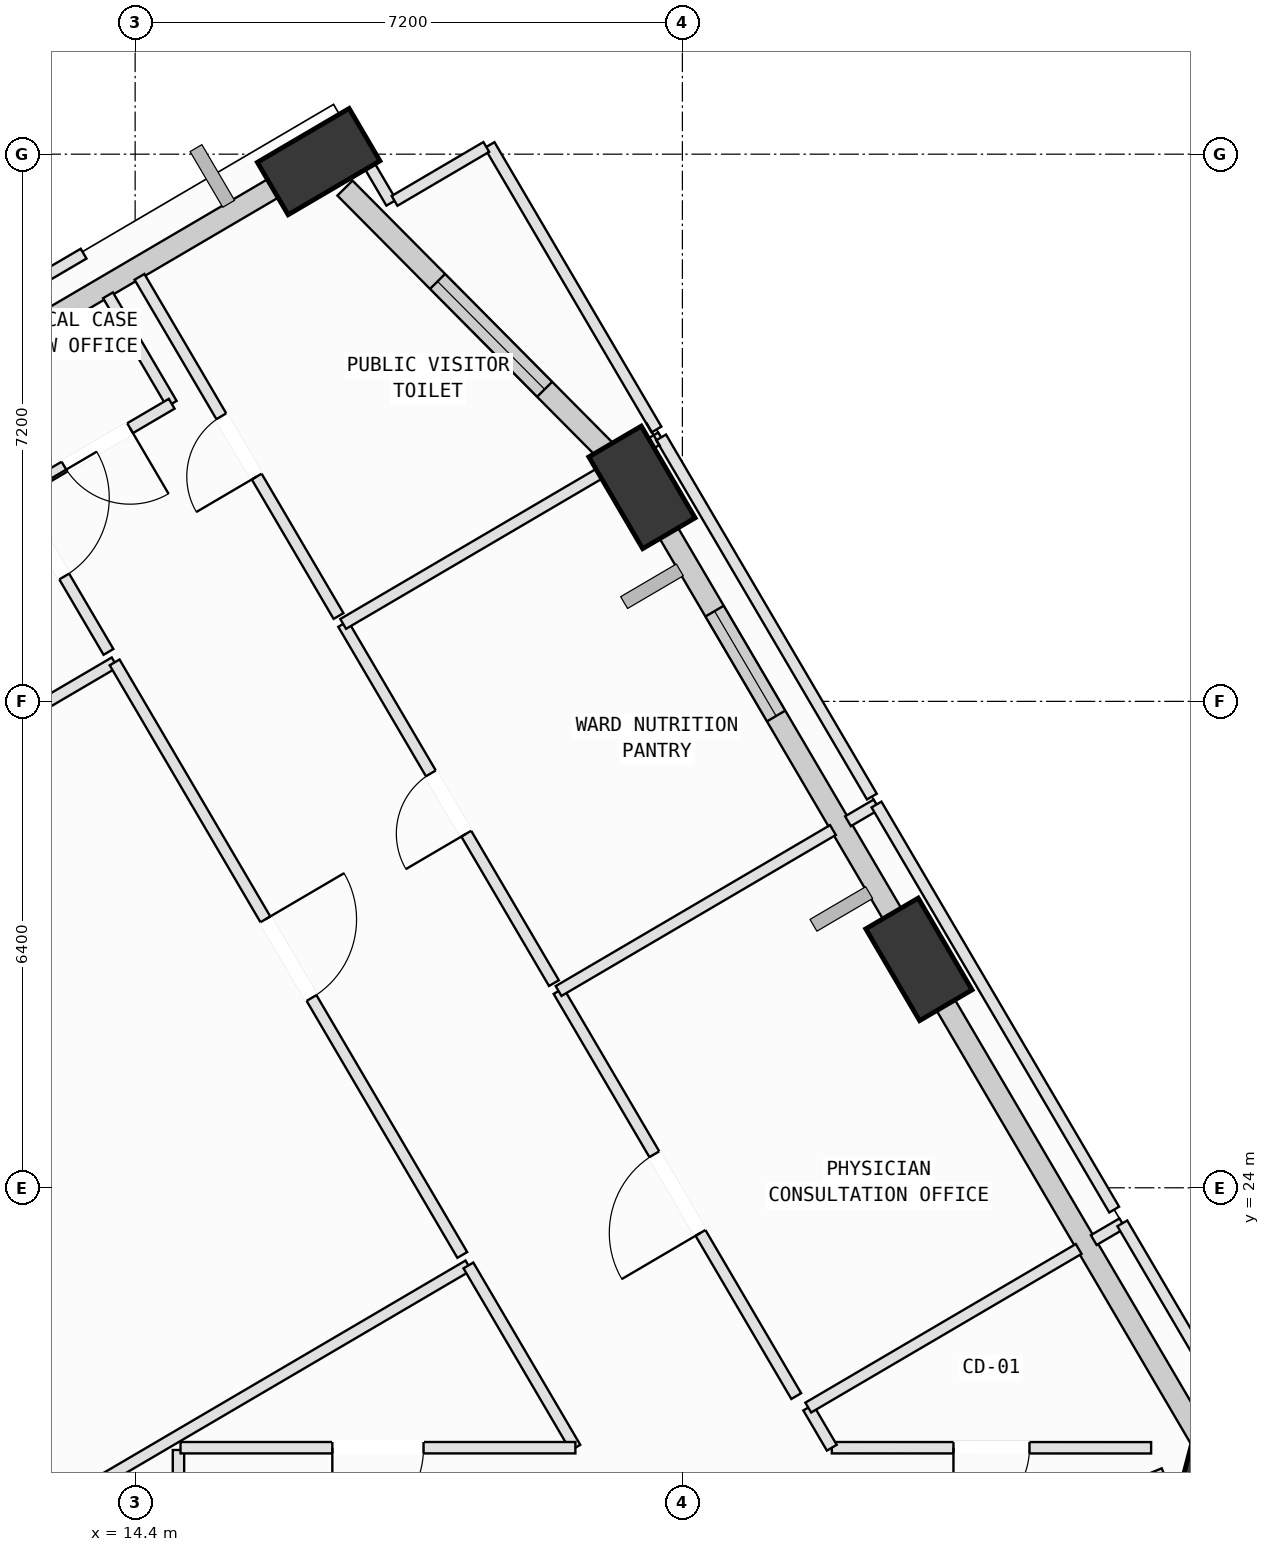
"""IFC4 building model, lengths in metres.
Left out: names, types, materials, properties, quantities, classifications, styles, units other than length and angle.
Written with IfcOpenShell. Run it as: python <this file> out.ifc"""

import sys

from ifc_helpers import new_model, si_unit, direction, frame, frame_2d, origin, origin_2d, place, context, subcontext, project, spatial, rectangle, extrude, element, fill, save


model = new_model("IFC4")
c1 = context("Model", 3, precision=1e-05, world=origin(), true_north=direction((0.0, 1.0)))
c2 = subcontext(c1, "Body", "Model", "MODEL_VIEW")
j1 = project(units=[si_unit("LENGTHUNIT", "METRE"), si_unit("PLANEANGLEUNIT", "RADIAN")], contexts=[c1])
p1 = place(None, origin())
s1 = spatial("IfcSite", under=j1, at=p1, CompositionType="ELEMENT")
p2 = place(p1, origin())
s2 = spatial("IfcBuilding", under=s1, at=p2, CompositionType="ELEMENT")
p3 = place(p2, frame((0.0, 0.0, 153.8)))
s3 = spatial("IfcBuildingStorey", under=s2, at=p3, CompositionType="ELEMENT", Elevation=153.8)
p4 = place(p3, frame((28.634, 20.321, 0.002), z_axis=(0.018686718776, -0.020396614612, 0.999617319105), x_axis=(-0.467601093999, 0.883534166025, 0.026769280116)))
e1 = element("IfcColumn", 1, at=p4, inside=s3, PredefinedType="COLUMN", context=c2, shape_type="SweptSolid", body=[
    extrude(rectangle(XDim=1.4, YDim=0.8, at=origin_2d()), origin(), (0.0, 0.0, 1.0), 3.998),
])
p5 = place(p3, frame((24.712, 27.006, 0.002), z_axis=(-0.008851816593, -0.036933441647, 0.999278522851), x_axis=(-0.291217556867, 0.956095845125, 0.032757739664)))
e2 = element("IfcColumn", 2, at=p5, inside=s3, PredefinedType="COLUMN", context=c2, shape_type="SweptSolid", body=[
    extrude(rectangle(XDim=1.4, YDim=0.8, at=origin_2d()), origin(), (0.0, 0.0, 1.0), 3.999),
])
p6 = place(p3, frame((21.068, 33.216, 0.002), z_axis=(-0.034388116319, -0.052130921015, 0.998048007127), x_axis=(0.051597216998, 0.997214254975, 0.053865173095)))
e3 = element("IfcColumn", 3, at=p6, inside=s3, PredefinedType="COLUMN", context=c2, shape_type="SweptSolid", body=[
    extrude(rectangle(XDim=1.4, YDim=0.8, at=origin_2d()), origin(), (0.0, 0.0, 1.0), 4.004),
])
p7 = place(p3, frame((16.814, 37.502, 0.002), z_axis=(-0.051852664615, -0.069745485504, 0.996216275928), x_axis=(0.992953500055, -0.110041878565, 0.043978764079)))
e4 = element("IfcColumn", 4, at=p7, inside=s3, PredefinedType="COLUMN", context=c2, shape_type="SweptSolid", body=[
    extrude(rectangle(XDim=1.4, YDim=0.8, at=origin_2d()), origin(), (0.0, 0.0, 1.0), 4.011),
])
p8 = place(p3, frame((28.41, 20.702, 0.0), z_axis=(0.0, 0.0, 1.0), x_axis=(-0.50604756903, 0.862505569767, 0.0)))
e5 = element("IfcWall", 5, at=p8, inside=s3, PredefinedType="SOLIDWALL", context=c2, shape_type="SweptSolid", body=[
    extrude(rectangle(XDim=6.76, YDim=0.28, at=frame_2d((3.38, 0.0))), origin(), (0.0, 0.0, 1.0), 3.165),
])
p9 = place(p3, frame((24.49, 27.384, 0.0), z_axis=(0.0, 0.0, 1.0), x_axis=(-0.506018502958, 0.862522622697, 0.0)))
e6 = element("IfcWall", 6, at=p9, inside=s3, PredefinedType="SOLIDWALL", context=c2, shape_type="SweptSolid", body=[
    extrude(rectangle(XDim=6.223, YDim=0.28, at=frame_2d((3.111, 0.0))), origin(), (0.0, 0.0, 1.0), 3.165),
])
p10 = place(p9, frame((3.274, 0.0, 0.75)))
e7 = element("IfcOpeningElement", 7, at=p10, cuts=e6, PredefinedType="OPENING", context=c2, shape_type="SweptSolid", body=[
    extrude(rectangle(XDim=1.6, YDim=1.95, at=frame_2d((0.8, 0.975))), frame((0.0, 0.15, 0.0), z_axis=(0.0, -1.0, 0.0), x_axis=(1.0, 0.0, 0.0)), (0.0, 0.0, 1.0), 0.3),
])
p11 = place(p3, frame((17.16, 37.154, 0.0), z_axis=(0.0, 0.0, 1.0), x_axis=(0.704417095587, -0.709786274483, 0.0)))
e8 = element("IfcWall", 8, at=p11, inside=s3, PredefinedType="SOLIDWALL", context=c2, shape_type="SweptSolid", body=[
    extrude(rectangle(XDim=5.093, YDim=0.28, at=frame_2d((2.546, 0.0))), origin(), (0.0, 0.0, 1.0), 3.165),
])
p12 = place(p11, frame((1.729, 0.0, 0.75)))
e9 = element("IfcOpeningElement", 9, at=p12, cuts=e8, PredefinedType="OPENING", context=c2, shape_type="SweptSolid", body=[
    extrude(rectangle(XDim=2.0, YDim=1.95, at=frame_2d((1.0, 0.975))), frame((0.0, 0.15, 0.0), z_axis=(0.0, -1.0, 0.0), x_axis=(1.0, 0.0, 0.0)), (0.0, 0.0, 1.0), 0.3),
])
p13 = place(p3, frame((10.015, 33.513, 0.0), z_axis=(0.0, 0.0, 1.0), x_axis=(0.862501326744, 0.506054800753, 0.0)))
e10 = element("IfcWall", 10, at=p13, inside=s3, PredefinedType="SOLIDWALL", context=c2, shape_type="SweptSolid", body=[
    extrude(rectangle(XDim=7.231, YDim=0.28, at=frame_2d((3.615, 0.0))), origin(), (0.0, 0.0, 1.0), 3.165),
])
p14 = place(p3, frame((14.97, 20.55, 0.0), z_axis=(0.0, 0.0, 1.0), x_axis=(0.0, -1.0, 0.0)))
e11 = element("IfcWall", 11, at=p14, inside=s3, PredefinedType="PARTITIONING", context=c2, shape_type="SweptSolid", body=[
    extrude(rectangle(XDim=2.32, YDim=0.15, at=frame_2d((1.16, 0.0))), origin(), (0.0, 0.0, 1.0), 3.78),
])
p15 = place(p3, frame((7.025, 16.078, 0.0), z_axis=(0.0, 0.0, 1.0), x_axis=(0.862494790815, 0.506065940186, 0.0)))
e12 = element("IfcWall", 12, at=p15, inside=s3, PredefinedType="PARTITIONING", context=c2, shape_type="SweptSolid", body=[
    extrude(rectangle(XDim=13.635, YDim=0.15, at=frame_2d((6.817, 0.0))), origin(), (0.0, 0.0, 1.0), 3.78),
])
p16 = place(p3, frame((18.785, 22.978, 0.0), z_axis=(0.0, 0.0, 1.0), x_axis=(0.506064259936, -0.862495776694, 0.0)))
e13 = element("IfcWall", 13, at=p16, inside=s3, PredefinedType="PARTITIONING", context=c2, shape_type="SweptSolid", body=[
    extrude(rectangle(XDim=2.78, YDim=0.15, at=frame_2d((1.39, 0.0))), origin(), (0.0, 0.0, 1.0), 3.78),
])
p17 = place(p3, frame((20.192, 20.58, 0.0), z_axis=(0.0, 0.0, 1.0), x_axis=(-1.0, 0.0, 0.0)))
e14 = element("IfcWall", 14, at=p17, inside=s3, PredefinedType="PARTITIONING", context=c2, shape_type="SweptSolid", body=[
    extrude(rectangle(XDim=5.195, YDim=0.15, at=frame_2d((2.597, 0.0))), origin(), (0.0, 0.0, 1.0), 3.78),
])
p18 = place(p17, frame((1.998, 0.0, 0.0)))
e15 = element("IfcOpeningElement", 15, at=p18, cuts=e14, PredefinedType="OPENING", context=c2, shape_type="SweptSolid", body=[
    extrude(rectangle(XDim=1.2, YDim=2.15, at=frame_2d((0.6, 1.075))), frame((0.0, 0.085, 0.0), z_axis=(0.0, -1.0, 0.0), x_axis=(1.0, 0.0, 0.0)), (0.0, 0.0, 1.0), 0.17),
])
p19 = place(p3, frame((2.072, 23.839, 0.0), z_axis=(0.0, 0.0, 1.0), x_axis=(0.862523991111, 0.506016170452, 0.0)))
e16 = element("IfcWall", 16, at=p19, inside=s3, PredefinedType="PARTITIONING", context=c2, shape_type="SweptSolid", body=[
    extrude(rectangle(XDim=13.98, YDim=0.15, at=frame_2d((6.99, 0.0))), origin(), (0.0, 0.0, 1.0), 3.78),
])
p20 = place(p3, frame((14.13, 30.913, 0.0), z_axis=(0.0, 0.0, 1.0), x_axis=(0.506007110353, -0.862529306327, 0.0)))
e17 = element("IfcWall", 17, at=p20, inside=s3, PredefinedType="PARTITIONING", context=c2, shape_type="SweptSolid", body=[
    extrude(rectangle(XDim=9.04, YDim=0.15, at=frame_2d((4.52, 0.0))), origin(), (0.0, 0.0, 1.0), 3.78),
])
p21 = place(p20, frame((3.92, 0.0, 0.0)))
e18 = element("IfcOpeningElement", 18, at=p21, cuts=e17, PredefinedType="OPENING", context=c2, shape_type="SweptSolid", body=[
    extrude(rectangle(XDim=1.2, YDim=2.15, at=frame_2d((0.6, 1.075))), frame((0.0, 0.085, 0.0), z_axis=(0.0, -1.0, 0.0), x_axis=(1.0, 0.0, 0.0)), (0.0, 0.0, 1.0), 0.17),
])
p22 = place(p3, frame((11.999, 34.544, 0.0), z_axis=(0.0, 0.0, 1.0), x_axis=(0.506174252811, -0.862431229601, 0.0)))
e19 = element("IfcWall", 19, at=p22, inside=s3, PredefinedType="PARTITIONING", context=c2, shape_type="SweptSolid", body=[
    extrude(rectangle(XDim=4.05, YDim=0.15, at=frame_2d((2.025, 0.0))), origin(), (0.0, 0.0, 1.0), 3.78),
])
p23 = place(p22, frame((1.7, 0.0, 0.0)))
e20 = element("IfcOpeningElement", 20, at=p23, cuts=e19, PredefinedType="OPENING", context=c2, shape_type="SweptSolid", body=[
    extrude(rectangle(XDim=1.2, YDim=2.15, at=frame_2d((0.6, 1.075))), frame((0.0, 0.085, 0.0), z_axis=(0.0, -1.0, 0.0), x_axis=(1.0, 0.0, 0.0)), (0.0, 0.0, 1.0), 0.17),
])
p24 = place(p3, frame((28.082, 19.691, 0.0), z_axis=(0.0, 0.0, 1.0), x_axis=(-0.384153472045, 0.92326925104, 0.0)))
e21 = element("IfcWall", 21, at=p24, inside=s3, PredefinedType="PARTITIONING", context=c2, shape_type="SweptSolid", body=[
    extrude(rectangle(XDim=0.638, YDim=0.15, at=frame_2d((0.319, 0.0))), origin(), (0.0, 0.0, 1.0), 3.78),
])
p25 = place(p3, frame((27.767, 20.579, 0.0), z_axis=(0.0, 0.0, 1.0), x_axis=(-0.999999972983, 0.000232450017, 0.0)))
e22 = element("IfcWall", 22, at=p25, inside=s3, PredefinedType="PARTITIONING", context=c2, shape_type="SweptSolid", body=[
    extrude(rectangle(XDim=4.201, YDim=0.15, at=frame_2d((2.101, 0.0))), origin(), (0.0, 0.0, 1.0), 3.78),
])
p26 = place(p25, frame((1.601, 0.0, 0.0)))
e23 = element("IfcOpeningElement", 23, at=p26, cuts=e22, PredefinedType="OPENING", context=c2, shape_type="SweptSolid", body=[
    extrude(rectangle(XDim=1.0, YDim=2.12, at=frame_2d((0.5, 1.06))), frame((0.0, 0.085, 0.0), z_axis=(0.0, -1.0, 0.0), x_axis=(1.0, 0.0, 0.0)), (0.0, 0.0, 1.0), 0.17),
])
p27 = place(p3, frame((23.566, 20.58, 0.0), z_axis=(0.0, 0.0, 1.0), x_axis=(-0.506200568764, 0.862415783821, 0.0)))
e24 = element("IfcWall", 24, at=p27, inside=s3, PredefinedType="PARTITIONING", context=c2, shape_type="SweptSolid", body=[
    extrude(rectangle(XDim=0.612, YDim=0.15, at=frame_2d((0.306, 0.0))), origin(), (0.0, 0.0, 1.0), 3.78),
])
p28 = place(p3, frame((23.256, 21.108, 0.0), z_axis=(0.0, 0.0, 1.0), x_axis=(0.862537649449, 0.50599288857, 0.0)))
e25 = element("IfcWall", 25, at=p28, inside=s3, PredefinedType="PARTITIONING", context=c2, shape_type="SweptSolid", body=[
    extrude(rectangle(XDim=4.125, YDim=0.15, at=frame_2d((2.062, 0.0))), origin(), (0.0, 0.0, 1.0), 3.78),
])
p29 = place(p3, frame((27.012, 23.312, 0.0), z_axis=(0.0, 0.0, 1.0), x_axis=(0.863127684472, 0.504985742668, 0.0)))
e26 = element("IfcWall", 26, at=p29, inside=s3, PredefinedType="PARTITIONING", context=c2, shape_type="SweptSolid", body=[
    extrude(rectangle(XDim=0.436, YDim=0.15, at=frame_2d((0.218, 0.0))), origin(), (0.0, 0.0, 1.0), 3.78),
])
p30 = place(p3, frame((27.388, 23.532, 0.0), z_axis=(0.0, 0.0, 1.0), x_axis=(0.506042653576, -0.862508453733, 0.0)))
e27 = element("IfcWall", 27, at=p30, inside=s3, PredefinedType="PARTITIONING", context=c2, shape_type="SweptSolid", body=[
    extrude(rectangle(XDim=2.85, YDim=0.15, at=frame_2d((1.425, 0.0))), origin(), (0.0, 0.0, 1.0), 3.78),
])
p31 = place(p3, frame((23.098, 21.259, 0.0), z_axis=(0.0, 0.0, 1.0), x_axis=(-0.506011476282, 0.862526745018, 0.0)))
e28 = element("IfcWall", 28, at=p31, inside=s3, PredefinedType="PARTITIONING", context=c2, shape_type="SweptSolid", body=[
    extrude(rectangle(XDim=6.18, YDim=0.15, at=frame_2d((3.09, 0.0))), origin(), (0.0, 0.0, 1.0), 3.78),
])
p32 = place(p31, frame((2.49, 0.0, 0.0)))
e29 = element("IfcOpeningElement", 29, at=p32, cuts=e28, PredefinedType="OPENING", context=c2, shape_type="SweptSolid", body=[
    extrude(rectangle(XDim=1.2, YDim=2.15, at=frame_2d((0.6, 1.075))), frame((0.0, 0.085, 0.0), z_axis=(0.0, -1.0, 0.0), x_axis=(1.0, 0.0, 0.0)), (0.0, 0.0, 1.0), 0.17),
])
p33 = place(p3, frame((19.971, 26.589, 0.0), z_axis=(0.0, 0.0, 1.0), x_axis=(0.86252592409, 0.506012875599, 0.0)))
e30 = element("IfcWall", 30, at=p33, inside=s3, PredefinedType="PARTITIONING", context=c2, shape_type="SweptSolid", body=[
    extrude(rectangle(XDim=4.186, YDim=0.15, at=frame_2d((2.093, 0.0))), origin(), (0.0, 0.0, 1.0), 3.78),
])
p34 = place(p3, frame((23.779, 28.823, 0.0), z_axis=(0.0, 0.0, 1.0), x_axis=(0.862554315404, 0.505964477981, 0.0)))
e31 = element("IfcWall", 31, at=p34, inside=s3, PredefinedType="PARTITIONING", context=c2, shape_type="SweptSolid", body=[
    extrude(rectangle(XDim=0.435, YDim=0.15, at=frame_2d((0.217, 0.0))), origin(), (0.0, 0.0, 1.0), 3.78),
])
p35 = place(p3, frame((24.154, 29.043, 0.0), z_axis=(0.0, 0.0, 1.0), x_axis=(0.506011476282, -0.862526745018, 0.0)))
e32 = element("IfcWall", 32, at=p35, inside=s3, PredefinedType="PARTITIONING", context=c2, shape_type="SweptSolid", body=[
    extrude(rectangle(XDim=6.18, YDim=0.15, at=frame_2d((3.09, 0.0))), origin(), (0.0, 0.0, 1.0), 3.78),
])
p36 = place(p3, frame((19.91, 26.693, 0.0), z_axis=(0.0, 0.0, 1.0), x_axis=(-0.506077370403, 0.862488084072, 0.0)))
e33 = element("IfcWall", 33, at=p36, inside=s3, PredefinedType="PARTITIONING", context=c2, shape_type="SweptSolid", body=[
    extrude(rectangle(XDim=5.479, YDim=0.15, at=frame_2d((2.74, 0.0))), origin(), (0.0, 0.0, 1.0), 3.78),
])
p37 = place(p36, frame((2.28, 0.0, 0.0)))
e34 = element("IfcOpeningElement", 34, at=p37, cuts=e33, PredefinedType="OPENING", context=c2, shape_type="SweptSolid", body=[
    extrude(rectangle(XDim=0.92, YDim=2.1, at=frame_2d((0.46, 1.05))), frame((0.0, 0.085, 0.0), z_axis=(0.0, -1.0, 0.0), x_axis=(1.0, 0.0, 0.0)), (0.0, 0.0, 1.0), 0.17),
])
p38 = place(p3, frame((17.137, 31.419, 0.0), z_axis=(0.0, 0.0, 1.0), x_axis=(0.862476712349, 0.506096750292, 0.0)))
e35 = element("IfcWall", 35, at=p38, inside=s3, PredefinedType="PARTITIONING", context=c2, shape_type="SweptSolid", body=[
    extrude(rectangle(XDim=4.069, YDim=0.15, at=frame_2d((2.034, 0.0))), origin(), (0.0, 0.0, 1.0), 3.78),
])
p39 = place(p3, frame((20.848, 33.596, 0.0), z_axis=(0.0, 0.0, 1.0), x_axis=(0.862449638913, 0.506142885298, 0.0)))
e36 = element("IfcWall", 36, at=p39, inside=s3, PredefinedType="PARTITIONING", context=c2, shape_type="SweptSolid", body=[
    extrude(rectangle(XDim=0.547, YDim=0.15, at=frame_2d((0.274, 0.0))), origin(), (0.0, 0.0, 1.0), 3.78),
])
p40 = place(p3, frame((21.32, 33.873, 0.0), z_axis=(0.0, 0.0, 1.0), x_axis=(0.506057922568, -0.862499495076, 0.0)))
e37 = element("IfcWall", 37, at=p40, inside=s3, PredefinedType="PARTITIONING", context=c2, shape_type="SweptSolid", body=[
    extrude(rectangle(XDim=5.479, YDim=0.15, at=frame_2d((2.74, 0.0))), origin(), (0.0, 0.0, 1.0), 3.78),
])
p41 = place(p3, frame((19.063, 37.72, 0.0), z_axis=(0.0, 0.0, 1.0), x_axis=(0.50604865204, -0.862504934344, 0.0)))
e38 = element("IfcWall", 38, at=p41, inside=s3, PredefinedType="PARTITIONING", context=c2, shape_type="SweptSolid", body=[
    extrude(rectangle(XDim=4.34, YDim=0.15, at=frame_2d((2.17, 0.0))), origin(), (0.0, 0.0, 1.0), 3.78),
])
p42 = place(p3, frame((17.076, 31.523, 0.0), z_axis=(0.0, 0.0, 1.0), x_axis=(-0.506089954955, 0.86248069978, 0.0)))
e39 = element("IfcWall", 39, at=p42, inside=s3, PredefinedType="PARTITIONING", context=c2, shape_type="SweptSolid", body=[
    extrude(rectangle(XDim=5.175, YDim=0.15, at=frame_2d((2.587, 0.0))), origin(), (0.0, 0.0, 1.0), 3.78),
])
p43 = place(p42, frame((2.127, 0.0, 0.0)))
e40 = element("IfcOpeningElement", 40, at=p43, cuts=e39, PredefinedType="OPENING", context=c2, shape_type="SweptSolid", body=[
    extrude(rectangle(XDim=0.92, YDim=2.1, at=frame_2d((0.46, 1.05))), frame((0.0, 0.085, 0.0), z_axis=(0.0, -1.0, 0.0), x_axis=(1.0, 0.0, 0.0)), (0.0, 0.0, 1.0), 0.17),
])
p44 = place(p3, frame((16.156, 37.336, 0.0), z_axis=(0.0, 0.0, 1.0), x_axis=(0.862273197532, 0.506443415217, 0.0)))
e41 = element("IfcWall", 41, at=p44, inside=s3, PredefinedType="PARTITIONING", context=c2, shape_type="SweptSolid", body=[
    extrude(rectangle(XDim=1.203, YDim=0.15, at=frame_2d((0.602, 0.0))), origin(), (0.0, 0.0, 1.0), 3.165),
])
p45 = place(p3, frame((17.218, 37.902, 0.0), z_axis=(0.0, 0.0, 1.0), x_axis=(0.505914729654, -0.862583495274, 0.0)))
e42 = element("IfcWall", 42, at=p45, inside=s3, PredefinedType="PARTITIONING", context=c2, shape_type="SweptSolid", body=[
    extrude(rectangle(XDim=1.091, YDim=0.15, at=frame_2d((0.545, 0.0))), origin(), (0.0, 0.0, 1.0), 3.78),
])
p46 = place(p3, frame((17.813, 36.986, 0.0), z_axis=(0.0, 0.0, 1.0), x_axis=(0.862256846082, 0.506471254252, 0.0)))
e43 = element("IfcWall", 43, at=p46, inside=s3, PredefinedType="PARTITIONING", context=c2, shape_type="SweptSolid", body=[
    extrude(rectangle(XDim=1.4, YDim=0.15, at=frame_2d((0.7, 0.0))), origin(), (0.0, 0.0, 1.0), 3.78),
])
p47 = place(p3, frame((7.995, 32.931, 0.0), z_axis=(0.0, 0.0, 1.0), x_axis=(0.86249986981, 0.506057283889, 0.0)))
e44 = element("IfcWall", 44, at=p47, inside=s3, PredefinedType="PARTITIONING", context=c2, shape_type="SweptSolid", body=[
    extrude(rectangle(XDim=6.64, YDim=0.15, at=frame_2d((3.32, 0.0))), origin(), (0.0, 0.0, 1.0), 3.78),
])
p48 = place(p3, frame((14.043, 35.743, 0.0), z_axis=(0.0, 0.0, 1.0), x_axis=(0.50644622965, -0.862271544511, 0.0)))
e45 = element("IfcWall", 45, at=p48, inside=s3, PredefinedType="PARTITIONING", context=c2, shape_type="SweptSolid", body=[
    extrude(rectangle(XDim=1.655, YDim=0.15, at=frame_2d((0.828, 0.0))), origin(), (0.0, 0.0, 1.0), 3.78),
])
p49 = place(p3, frame((14.881, 34.316, 0.0), z_axis=(0.0, 0.0, 1.0), x_axis=(-0.862481095213, -0.506089281056, 0.0)))
e46 = element("IfcWall", 46, at=p49, inside=s3, PredefinedType="PARTITIONING", context=c2, shape_type="SweptSolid", body=[
    extrude(rectangle(XDim=2.27, YDim=0.15, at=frame_2d((1.135, 0.0))), origin(), (0.0, 0.0, 1.0), 3.78),
])
p50 = place(p49, frame((0.635, 0.0, 0.0)))
e47 = element("IfcOpeningElement", 47, at=p50, cuts=e46, PredefinedType="OPENING", context=c2, shape_type="SweptSolid", body=[
    extrude(rectangle(XDim=1.0, YDim=2.12, at=frame_2d((0.5, 1.06))), frame((0.0, 0.085, 0.0), z_axis=(0.0, -1.0, 0.0), x_axis=(1.0, 0.0, 0.0)), (0.0, 0.0, 1.0), 0.17),
])
p51 = place(p10, origin())
e48 = element("IfcWindow", 48, at=p51, inside=s3, PartitioningType="SINGLE_PANEL", PredefinedType="WINDOW", context=c2, shape_type="SweptSolid", body=[
    extrude(rectangle(XDim=1.6, YDim=1.95, at=frame_2d((0.8, 0.975))), frame((0.0, 0.03, 0.0), z_axis=(0.0, -1.0, 0.0), x_axis=(1.0, 0.0, 0.0)), (0.0, 0.0, 1.0), 0.06),
])
fill(e7, e48)
p52 = place(p12, origin())
e49 = element("IfcWindow", 49, at=p52, inside=s3, PartitioningType="SINGLE_PANEL", PredefinedType="WINDOW", context=c2, shape_type="SweptSolid", body=[
    extrude(rectangle(XDim=2.0, YDim=1.95, at=frame_2d((1.0, 0.975))), frame((0.0, 0.03, 0.0), z_axis=(0.0, -1.0, 0.0), x_axis=(1.0, 0.0, 0.0)), (0.0, 0.0, 1.0), 0.06),
])
fill(e9, e49)
p53 = place(p18, origin())
e50 = element("IfcDoor", 50, at=p53, inside=s3, OperationType="SINGLE_SWING_RIGHT", PredefinedType="DOOR", context=c2, shape_type="SweptSolid", body=[
    extrude(rectangle(XDim=1.2, YDim=2.15, at=frame_2d((0.6, 1.075))), frame((0.0, 0.025, 0.0), z_axis=(0.0, -1.0, 0.0), x_axis=(1.0, 0.0, 0.0)), (0.0, 0.0, 1.0), 0.05),
])
fill(e15, e50)
p54 = place(p21, origin())
e51 = element("IfcDoor", 51, at=p54, inside=s3, OperationType="SINGLE_SWING_LEFT", PredefinedType="DOOR", context=c2, shape_type="SweptSolid", body=[
    extrude(rectangle(XDim=1.2, YDim=2.15, at=frame_2d((0.6, 1.075))), frame((0.0, 0.025, 0.0), z_axis=(0.0, -1.0, 0.0), x_axis=(1.0, 0.0, 0.0)), (0.0, 0.0, 1.0), 0.05),
])
fill(e18, e51)
p55 = place(p23, origin())
e52 = element("IfcDoor", 52, at=p55, inside=s3, OperationType="SINGLE_SWING_LEFT", PredefinedType="DOOR", context=c2, shape_type="SweptSolid", body=[
    extrude(rectangle(XDim=1.2, YDim=2.15, at=frame_2d((0.6, 1.075))), frame((0.0, 0.025, 0.0), z_axis=(0.0, -1.0, 0.0), x_axis=(1.0, 0.0, 0.0)), (0.0, 0.0, 1.0), 0.05),
])
fill(e20, e52)
p56 = place(p26, origin())
e53 = element("IfcDoor", 53, at=p56, inside=s3, OperationType="SINGLE_SWING_RIGHT", PredefinedType="DOOR", context=c2, shape_type="SweptSolid", body=[
    extrude(rectangle(XDim=1.0, YDim=2.12, at=frame_2d((0.5, 1.06))), frame((0.0, 0.025, 0.0), z_axis=(0.0, -1.0, 0.0), x_axis=(1.0, 0.0, 0.0)), (0.0, 0.0, 1.0), 0.05),
])
fill(e23, e53)
p57 = place(p32, origin())
e54 = element("IfcDoor", 54, at=p57, inside=s3, OperationType="SINGLE_SWING_LEFT", PredefinedType="DOOR", context=c2, shape_type="SweptSolid", body=[
    extrude(rectangle(XDim=1.2, YDim=2.15, at=frame_2d((0.6, 1.075))), frame((0.0, 0.025, 0.0), z_axis=(0.0, -1.0, 0.0), x_axis=(1.0, 0.0, 0.0)), (0.0, 0.0, 1.0), 0.05),
])
fill(e29, e54)
p58 = place(p37, origin())
e55 = element("IfcDoor", 55, at=p58, inside=s3, OperationType="SINGLE_SWING_LEFT", PredefinedType="DOOR", context=c2, shape_type="SweptSolid", body=[
    extrude(rectangle(XDim=0.92, YDim=2.1, at=frame_2d((0.46, 1.05))), frame((0.0, 0.025, 0.0), z_axis=(0.0, -1.0, 0.0), x_axis=(1.0, 0.0, 0.0)), (0.0, 0.0, 1.0), 0.05),
])
fill(e34, e55)
p59 = place(p43, origin())
e56 = element("IfcDoor", 56, at=p59, inside=s3, OperationType="SINGLE_SWING_LEFT", PredefinedType="DOOR", context=c2, shape_type="SweptSolid", body=[
    extrude(rectangle(XDim=0.92, YDim=2.1, at=frame_2d((0.46, 1.05))), frame((0.0, 0.025, 0.0), z_axis=(0.0, -1.0, 0.0), x_axis=(1.0, 0.0, 0.0)), (0.0, 0.0, 1.0), 0.05),
])
fill(e40, e56)
p60 = place(p50, origin())
e57 = element("IfcDoor", 57, at=p60, inside=s3, OperationType="SINGLE_SWING_LEFT", PredefinedType="DOOR", context=c2, shape_type="SweptSolid", body=[
    extrude(rectangle(XDim=1.0, YDim=2.12, at=frame_2d((0.5, 1.06))), frame((0.0, 0.025, 0.0), z_axis=(0.0, -1.0, 0.0), x_axis=(1.0, 0.0, 0.0)), (0.0, 0.0, 1.0), 0.05),
])
fill(e47, e57)
save(model, sys.argv[1])
